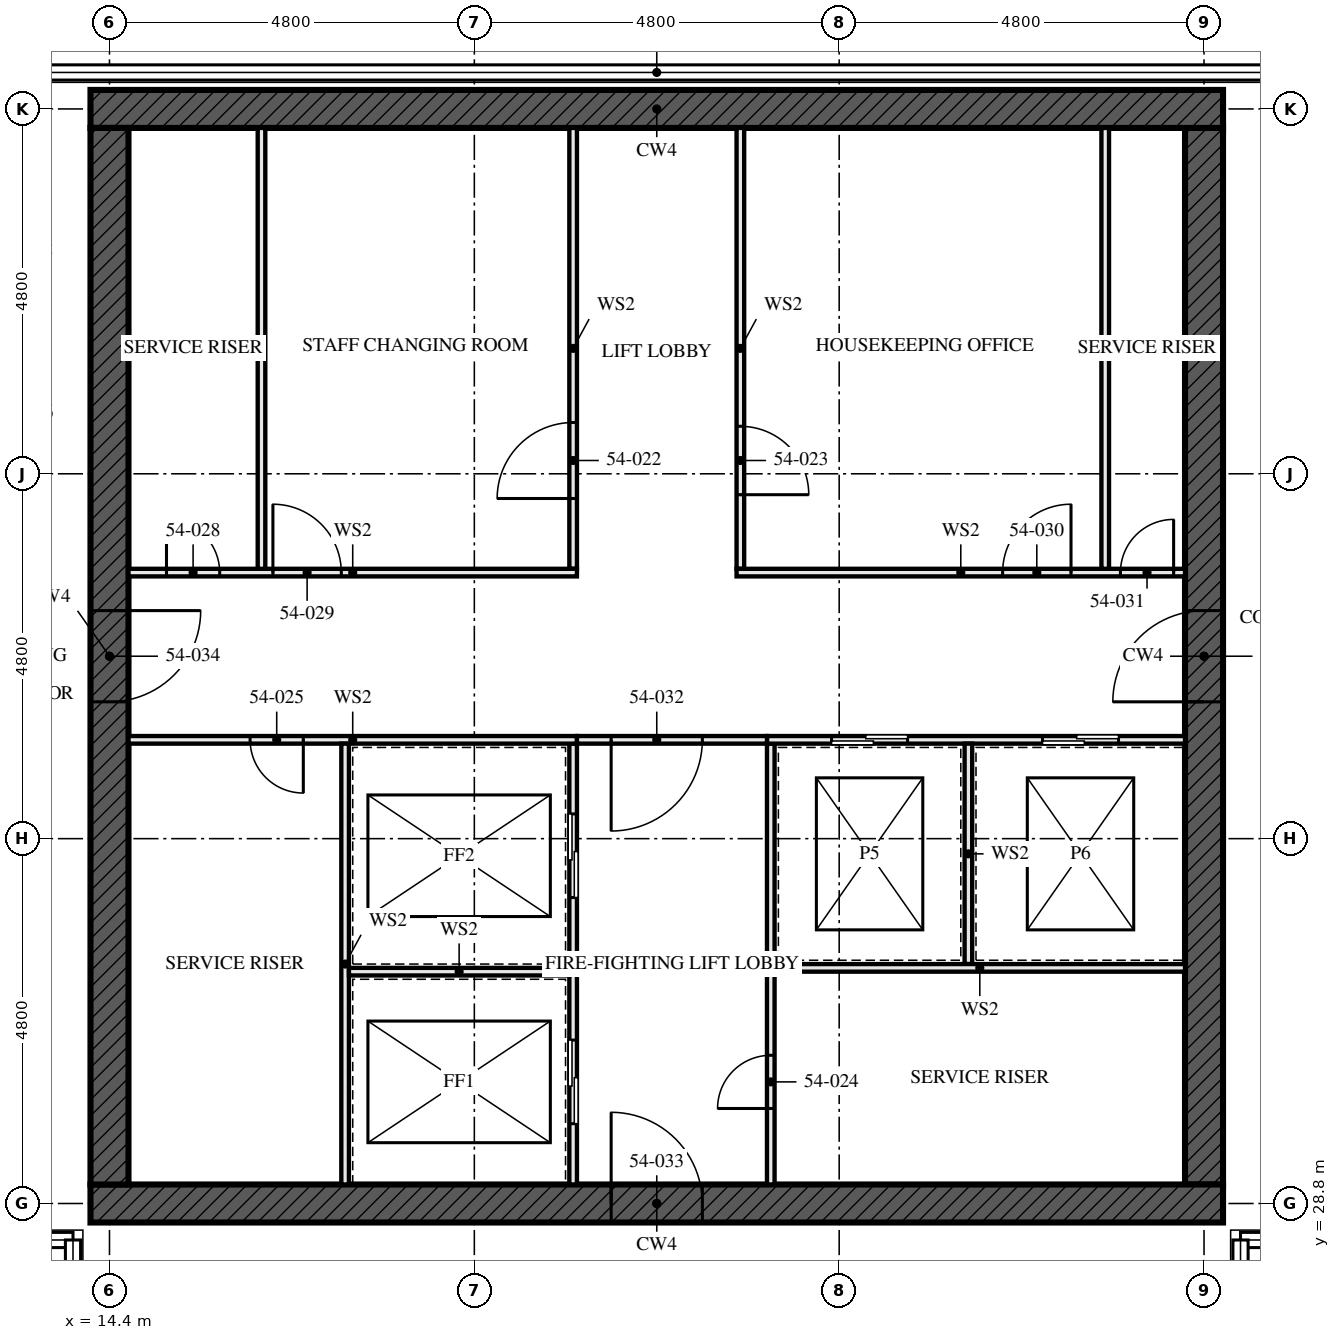
"""IFC4 building model, lengths in metres.
Left out: names, types, materials, properties, quantities, classifications, styles, units other than length and angle.
Written with IfcOpenShell. Run it as: python <this file> out.ifc"""

import sys

from ifc_helpers import new_model, si_unit, direction, frame, frame_2d, origin, place, context, subcontext, project, spatial, rectangle, extrude, element, fill, save


model = new_model("IFC4")
c1 = context("Model", 3, precision=1e-05, world=origin(), true_north=direction((0.0, 1.0)))
c2 = subcontext(c1, "Body", "Model", "MODEL_VIEW")
j1 = project(units=[si_unit("LENGTHUNIT", "METRE"), si_unit("PLANEANGLEUNIT", "RADIAN")], contexts=[c1])
p1 = place(None, origin())
s1 = spatial("IfcSite", under=j1, at=p1, CompositionType="ELEMENT")
p2 = place(p1, origin())
s2 = spatial("IfcBuilding", under=s1, at=p2, CompositionType="ELEMENT")
p3 = place(p2, frame((0.0, 0.0, 198.0)))
s3 = spatial("IfcBuildingStorey", under=s2, at=p3, CompositionType="ELEMENT", Elevation=198.0)
p4 = place(p3, frame((14.15, 28.8, -0.17), z_axis=(0.0, 0.0, 1.0), x_axis=(1.0, 0.0, 0.0)))
e1 = element("IfcWall", 1, at=p4, inside=s3, PredefinedType="SHEAR", context=c2, shape_type="SweptSolid", body=[
    extrude(rectangle(XDim=14.9, YDim=0.5, at=frame_2d((7.45, 0.0))), origin(), (0.0, 0.0, 1.0), 3.5),
])
p5 = place(p4, frame((6.85, 0.0, 0.17)))
e2 = element("IfcOpeningElement", 2, at=p5, cuts=e1, PredefinedType="OPENING", context=c2, shape_type="SweptSolid", body=[
    extrude(rectangle(XDim=1.2, YDim=2.1, at=frame_2d((0.6, 1.05))), frame((0.0, 0.26, 0.0), z_axis=(0.0, -1.0, 0.0), x_axis=(1.0, 0.0, 0.0)), (0.0, 0.0, 1.0), 0.521),
])
p6 = place(p3, frame((29.05, 43.2, -0.17), z_axis=(0.0, 0.0, 1.0), x_axis=(-1.0, 0.0, 0.0)))
e3 = element("IfcWall", 3, at=p6, inside=s3, PredefinedType="SHEAR", context=c2, shape_type="SweptSolid", body=[
    extrude(rectangle(XDim=14.9, YDim=0.5, at=frame_2d((7.45, 0.0))), origin(), (0.0, 0.0, 1.0), 3.5),
])
p7 = place(p3, frame((14.4, 42.95, -0.17), z_axis=(0.0, 0.0, 1.0), x_axis=(0.0, -1.0, 0.0)))
e4 = element("IfcWall", 4, at=p7, inside=s3, PredefinedType="SHEAR", context=c2, shape_type="SweptSolid", body=[
    extrude(rectangle(XDim=13.9, YDim=0.5, at=frame_2d((6.95, 0.0))), origin(), (0.0, 0.0, 1.0), 3.5),
])
p8 = place(p7, frame((6.35, 0.0, 0.17)))
e5 = element("IfcOpeningElement", 5, at=p8, cuts=e4, PredefinedType="OPENING", context=c2, shape_type="SweptSolid", body=[
    extrude(rectangle(XDim=1.2, YDim=2.1, at=frame_2d((0.6, 1.05))), frame((0.0, 0.26, 0.0), z_axis=(0.0, -1.0, 0.0), x_axis=(1.0, 0.0, 0.0)), (0.0, 0.0, 1.0), 0.521),
])
p9 = place(p3, frame((28.8, 29.05, -0.17), z_axis=(0.0, 0.0, 1.0), x_axis=(0.0, 1.0, 0.0)))
e6 = element("IfcWall", 6, at=p9, inside=s3, PredefinedType="SHEAR", context=c2, shape_type="SweptSolid", body=[
    extrude(rectangle(XDim=13.9, YDim=0.5, at=frame_2d((6.95, 0.0))), origin(), (0.0, 0.0, 1.0), 3.5),
])
p10 = place(p9, frame((6.35, 0.0, 0.17)))
e7 = element("IfcOpeningElement", 7, at=p10, cuts=e6, PredefinedType="OPENING", context=c2, shape_type="SweptSolid", body=[
    extrude(rectangle(XDim=1.2, YDim=2.1, at=frame_2d((0.6, 1.05))), frame((0.0, 0.26, 0.0), z_axis=(0.0, -1.0, 0.0), x_axis=(1.0, 0.0, 0.0)), (0.0, 0.0, 1.0), 0.521),
])
for number, where, z_axis, x_axis in (
    (8, (16.4, 37.15, 0.0), (0.0, 0.0, 1.0), (0.0, 1.0, 0.0)),
    (9, (27.5, 37.15, 0.0), (0.0, 0.0, 1.0), (0.0, 1.0, 0.0)),
):
    element("IfcWall", number, at=place(p3, frame(where, z_axis=z_axis, x_axis=x_axis)), inside=s3, PredefinedType="SOLIDWALL", context=c2, shape_type="SweptSolid", body=[
        extrude(rectangle(XDim=5.8, YDim=0.1, at=frame_2d((2.9, 0.0))), origin(), (0.0, 0.0, 1.0), 3.33),
    ])
p11 = place(p3, frame((20.5, 29.05, 0.0), z_axis=(0.0, 0.0, 1.0), x_axis=(0.0, 1.0, 0.0)))
e10 = element("IfcWall", 10, at=p11, inside=s3, PredefinedType="SOLIDWALL", context=c2, shape_type="SweptSolid", body=[
    extrude(rectangle(XDim=5.8, YDim=0.1, at=frame_2d((2.9, 0.0))), origin(), (0.0, 0.0, 1.0), 3.33),
])
p12 = place(p11, frame((0.8, 0.0, 0.0)))
e11 = element("IfcOpeningElement", 11, at=p12, cuts=e10, PredefinedType="OPENING", context=c2, shape_type="SweptSolid", body=[
    extrude(rectangle(XDim=1.1, YDim=2.3, at=frame_2d((0.55, 1.15))), frame((0.0, 0.061, 0.0), z_axis=(0.0, -1.0, 0.0), x_axis=(1.0, 0.0, 0.0)), (0.0, 0.0, 1.0), 0.121),
])
p13 = place(p11, frame((3.775, 0.0, 0.0)))
e12 = element("IfcOpeningElement", 12, at=p13, cuts=e10, PredefinedType="OPENING", context=c2, shape_type="SweptSolid", body=[
    extrude(rectangle(XDim=1.1, YDim=2.3, at=frame_2d((0.55, 1.15))), frame((0.0, 0.061, 0.0), z_axis=(0.0, -1.0, 0.0), x_axis=(1.0, 0.0, 0.0)), (0.0, 0.0, 1.0), 0.121),
])
p14 = place(p3, frame((20.5, 37.15, 0.0), z_axis=(0.0, 0.0, 1.0), x_axis=(0.0, 1.0, 0.0)))
e13 = element("IfcWall", 13, at=p14, inside=s3, PredefinedType="SOLIDWALL", context=c2, shape_type="SweptSolid", body=[
    extrude(rectangle(XDim=5.8, YDim=0.1, at=frame_2d((2.9, 0.0))), origin(), (0.0, 0.0, 1.0), 3.33),
])
p15 = place(p14, frame((0.925, 0.0, 0.0)))
e14 = element("IfcOpeningElement", 14, at=p15, cuts=e13, PredefinedType="OPENING", context=c2, shape_type="SweptSolid", body=[
    extrude(rectangle(XDim=1.0, YDim=2.1, at=frame_2d((0.5, 1.05))), frame((0.0, 0.061, 0.0), z_axis=(0.0, -1.0, 0.0), x_axis=(1.0, 0.0, 0.0)), (0.0, 0.0, 1.0), 0.121),
])
p16 = place(p3, frame((22.7, 37.15, 0.0), z_axis=(0.0, 0.0, 1.0), x_axis=(0.0, 1.0, 0.0)))
e15 = element("IfcWall", 15, at=p16, inside=s3, PredefinedType="SOLIDWALL", context=c2, shape_type="SweptSolid", body=[
    extrude(rectangle(XDim=5.8, YDim=0.1, at=frame_2d((2.9, 0.0))), origin(), (0.0, 0.0, 1.0), 3.33),
])
p17 = place(p16, frame((0.975, 0.0, 0.0)))
e16 = element("IfcOpeningElement", 16, at=p17, cuts=e15, PredefinedType="OPENING", context=c2, shape_type="SweptSolid", body=[
    extrude(rectangle(XDim=0.9, YDim=2.1, at=frame_2d((0.45, 1.05))), frame((0.0, 0.061, 0.0), z_axis=(0.0, -1.0, 0.0), x_axis=(1.0, 0.0, 0.0)), (0.0, 0.0, 1.0), 0.121),
])
p18 = place(p3, frame((23.1, 29.05, 0.0), z_axis=(0.0, 0.0, 1.0), x_axis=(0.0, 1.0, 0.0)))
e17 = element("IfcWall", 17, at=p18, inside=s3, PredefinedType="SOLIDWALL", context=c2, shape_type="SweptSolid", body=[
    extrude(rectangle(XDim=5.8, YDim=0.1, at=frame_2d((2.9, 0.0))), origin(), (0.0, 0.0, 1.0), 3.33),
])
p19 = place(p18, frame((1.0, 0.0, 0.0)))
e18 = element("IfcOpeningElement", 18, at=p19, cuts=e17, PredefinedType="OPENING", context=c2, shape_type="SweptSolid", body=[
    extrude(rectangle(XDim=0.7, YDim=2.1, at=frame_2d((0.35, 1.05))), frame((0.0, 0.061, 0.0), z_axis=(0.0, -1.0, 0.0), x_axis=(1.0, 0.0, 0.0)), (0.0, 0.0, 1.0), 0.121),
])
p20 = place(p3, frame((14.65, 34.9, 0.0), z_axis=(0.0, 0.0, 1.0), x_axis=(1.0, 0.0, 0.0)))
e19 = element("IfcWall", 19, at=p20, inside=s3, PredefinedType="SOLIDWALL", context=c2, shape_type="SweptSolid", body=[
    extrude(rectangle(XDim=5.9, YDim=0.1, at=frame_2d((2.95, 0.0))), origin(), (0.0, 0.0, 1.0), 3.33),
])
p21 = place(p20, frame((1.6, 0.0, 0.0)))
e20 = element("IfcOpeningElement", 20, at=p21, cuts=e19, PredefinedType="OPENING", context=c2, shape_type="SweptSolid", body=[
    extrude(rectangle(XDim=0.7, YDim=2.1, at=frame_2d((0.35, 1.05))), frame((0.0, 0.061, 0.0), z_axis=(0.0, -1.0, 0.0), x_axis=(1.0, 0.0, 0.0)), (0.0, 0.0, 1.0), 0.121),
])
p22 = place(p3, frame((23.05, 34.9, 0.0), z_axis=(0.0, 0.0, 1.0), x_axis=(1.0, 0.0, 0.0)))
e21 = element("IfcWall", 21, at=p22, inside=s3, PredefinedType="SOLIDWALL", context=c2, shape_type="SweptSolid", body=[
    extrude(rectangle(XDim=5.5, YDim=0.1, at=frame_2d((2.75, 0.0))), origin(), (0.0, 0.0, 1.0), 3.33),
])
p23 = place(p22, frame((0.85, 0.0, 0.0)))
e22 = element("IfcOpeningElement", 22, at=p23, cuts=e21, PredefinedType="OPENING", context=c2, shape_type="SweptSolid", body=[
    extrude(rectangle(XDim=1.0, YDim=2.1, at=frame_2d((0.5, 1.05))), frame((0.0, 0.061, 0.0), z_axis=(0.0, -1.0, 0.0), x_axis=(1.0, 0.0, 0.0)), (0.0, 0.0, 1.0), 0.121),
])
p24 = place(p22, frame((3.625, 0.0, 0.0)))
e23 = element("IfcOpeningElement", 23, at=p24, cuts=e21, PredefinedType="OPENING", context=c2, shape_type="SweptSolid", body=[
    extrude(rectangle(XDim=1.0, YDim=2.1, at=frame_2d((0.5, 1.05))), frame((0.0, 0.061, 0.0), z_axis=(0.0, -1.0, 0.0), x_axis=(1.0, 0.0, 0.0)), (0.0, 0.0, 1.0), 0.121),
])
p25 = place(p3, frame((14.65, 37.1, 0.0), z_axis=(0.0, 0.0, 1.0), x_axis=(1.0, 0.0, 0.0)))
e24 = element("IfcWall", 24, at=p25, inside=s3, PredefinedType="SOLIDWALL", context=c2, shape_type="SweptSolid", body=[
    extrude(rectangle(XDim=5.9, YDim=0.1, at=frame_2d((2.95, 0.0))), origin(), (0.0, 0.0, 1.0), 3.33),
])
p26 = place(p25, frame((0.5, 0.0, 0.0)))
e25 = element("IfcOpeningElement", 25, at=p26, cuts=e24, PredefinedType="OPENING", context=c2, shape_type="SweptSolid", body=[
    extrude(rectangle(XDim=0.7, YDim=2.1, at=frame_2d((0.35, 1.05))), frame((0.0, 0.061, 0.0), z_axis=(0.0, -1.0, 0.0), x_axis=(1.0, 0.0, 0.0)), (0.0, 0.0, 1.0), 0.121),
])
p27 = place(p25, frame((1.9, 0.0, 0.0)))
e26 = element("IfcOpeningElement", 26, at=p27, cuts=e24, PredefinedType="OPENING", context=c2, shape_type="SweptSolid", body=[
    extrude(rectangle(XDim=0.9, YDim=2.1, at=frame_2d((0.45, 1.05))), frame((0.0, 0.061, 0.0), z_axis=(0.0, -1.0, 0.0), x_axis=(1.0, 0.0, 0.0)), (0.0, 0.0, 1.0), 0.121),
])
p28 = place(p3, frame((22.65, 37.1, 0.0), z_axis=(0.0, 0.0, 1.0), x_axis=(1.0, 0.0, 0.0)))
e27 = element("IfcWall", 27, at=p28, inside=s3, PredefinedType="SOLIDWALL", context=c2, shape_type="SweptSolid", body=[
    extrude(rectangle(XDim=5.9, YDim=0.1, at=frame_2d((2.95, 0.0))), origin(), (0.0, 0.0, 1.0), 3.33),
])
p29 = place(p28, frame((3.5, 0.0, 0.0)))
e28 = element("IfcOpeningElement", 28, at=p29, cuts=e27, PredefinedType="OPENING", context=c2, shape_type="SweptSolid", body=[
    extrude(rectangle(XDim=0.9, YDim=2.1, at=frame_2d((0.45, 1.05))), frame((0.0, 0.061, 0.0), z_axis=(0.0, -1.0, 0.0), x_axis=(1.0, 0.0, 0.0)), (0.0, 0.0, 1.0), 0.121),
])
p30 = place(p28, frame((5.05, 0.0, 0.0)))
e29 = element("IfcOpeningElement", 29, at=p30, cuts=e27, PredefinedType="OPENING", context=c2, shape_type="SweptSolid", body=[
    extrude(rectangle(XDim=0.7, YDim=2.1, at=frame_2d((0.35, 1.05))), frame((0.0, 0.061, 0.0), z_axis=(0.0, -1.0, 0.0), x_axis=(1.0, 0.0, 0.0)), (0.0, 0.0, 1.0), 0.121),
])
p31 = place(p3, frame((20.55, 34.9, 0.0), z_axis=(0.0, 0.0, 1.0), x_axis=(1.0, 0.0, 0.0)))
e30 = element("IfcWall", 30, at=p31, inside=s3, PredefinedType="SOLIDWALL", context=c2, shape_type="SweptSolid", body=[
    extrude(rectangle(XDim=2.5, YDim=0.1, at=frame_2d((1.25, 0.0))), origin(), (0.0, 0.0, 1.0), 3.33),
])
p32 = place(p31, frame((0.45, 0.0, 0.0)))
e31 = element("IfcOpeningElement", 31, at=p32, cuts=e30, PredefinedType="OPENING", context=c2, shape_type="SweptSolid", body=[
    extrude(rectangle(XDim=1.2, YDim=2.1, at=frame_2d((0.6, 1.05))), frame((0.0, 0.061, 0.0), z_axis=(0.0, -1.0, 0.0), x_axis=(1.0, 0.0, 0.0)), (0.0, 0.0, 1.0), 0.121),
])
p33 = place(p3, frame((17.5, 29.05, 0.0), z_axis=(0.0, 0.0, 1.0), x_axis=(0.0, 1.0, 0.0)))
e32 = element("IfcWall", 32, at=p33, inside=s3, PredefinedType="SOLIDWALL", context=c2, shape_type="SweptSolid", body=[
    extrude(rectangle(XDim=5.8, YDim=0.1, at=frame_2d((2.9, 0.0))), origin(), (0.0, 0.0, 1.0), 3.33),
])
p34 = place(p3, frame((17.55, 31.85, 0.0), z_axis=(0.0, 0.0, 1.0), x_axis=(1.0, 0.0, 0.0)))
e33 = element("IfcWall", 33, at=p34, inside=s3, PredefinedType="SOLIDWALL", context=c2, shape_type="SweptSolid", body=[
    extrude(rectangle(XDim=2.9, YDim=0.1, at=frame_2d((1.45, 0.0))), origin(), (0.0, 0.0, 1.0), 3.33),
])
p35 = place(p3, frame((25.7, 31.95, 0.0), z_axis=(0.0, 0.0, 1.0), x_axis=(0.0, 1.0, 0.0)))
e34 = element("IfcWall", 34, at=p35, inside=s3, PredefinedType="SOLIDWALL", context=c2, shape_type="SweptSolid", body=[
    extrude(rectangle(XDim=2.9, YDim=0.1, at=frame_2d((1.45, 0.0))), origin(), (0.0, 0.0, 1.0), 3.33),
])
p36 = place(p3, frame((23.15, 31.9, 0.0), z_axis=(0.0, 0.0, 1.0), x_axis=(1.0, 0.0, 0.0)))
e35 = element("IfcWall", 35, at=p36, inside=s3, PredefinedType="SOLIDWALL", context=c2, shape_type="SweptSolid", body=[
    extrude(rectangle(XDim=5.4, YDim=0.1, at=frame_2d((2.7, 0.0))), origin(), (0.0, 0.0, 1.0), 3.33),
])
p37 = place(p12, origin())
e36 = element("IfcDoor", 36, at=p37, inside=s3, OperationType="SLIDING_TO_LEFT", PredefinedType="DOOR", context=c2, shape_type="SweptSolid", body=[
    extrude(rectangle(XDim=1.1, YDim=2.3, at=frame_2d((0.55, 1.15))), frame((0.0, 0.05, 0.0), z_axis=(0.0, -1.0, 0.0), x_axis=(1.0, 0.0, 0.0)), (0.0, 0.0, 1.0), 0.1),
])
fill(e11, e36)
p38 = place(p13, origin())
e37 = element("IfcDoor", 37, at=p38, inside=s3, OperationType="SLIDING_TO_LEFT", PredefinedType="DOOR", context=c2, shape_type="SweptSolid", body=[
    extrude(rectangle(XDim=1.1, YDim=2.3, at=frame_2d((0.55, 1.15))), frame((0.0, 0.05, 0.0), z_axis=(0.0, -1.0, 0.0), x_axis=(1.0, 0.0, 0.0)), (0.0, 0.0, 1.0), 0.1),
])
fill(e12, e37)
p39 = place(p15, origin())
e38 = element("IfcDoor", 38, at=p39, inside=s3, OperationType="SINGLE_SWING_RIGHT", PredefinedType="DOOR", context=c2, shape_type="SweptSolid", body=[
    extrude(rectangle(XDim=1.0, YDim=2.1, at=frame_2d((0.5, 1.05))), frame((0.0, 0.027, 0.0), z_axis=(0.0, -1.0, 0.0), x_axis=(1.0, 0.0, 0.0)), (0.0, 0.0, 1.0), 0.054),
])
fill(e14, e38)
p40 = place(p17, frame((0.9, 0.0, 0.0), z_axis=(0.0, 0.0, 1.0), x_axis=(-1.0, 0.0, 0.0)))
e39 = element("IfcDoor", 39, at=p40, inside=s3, OperationType="SINGLE_SWING_LEFT", PredefinedType="DOOR", context=c2, shape_type="SweptSolid", body=[
    extrude(rectangle(XDim=0.9, YDim=2.1, at=frame_2d((0.45, 1.05))), frame((0.0, 0.027, 0.0), z_axis=(0.0, -1.0, 0.0), x_axis=(1.0, 0.0, 0.0)), (0.0, 0.0, 1.0), 0.054),
])
fill(e16, e39)
p41 = place(p19, origin())
e40 = element("IfcDoor", 40, at=p41, inside=s3, OperationType="SINGLE_SWING_RIGHT", PredefinedType="DOOR", context=c2, shape_type="SweptSolid", body=[
    extrude(rectangle(XDim=0.7, YDim=2.1, at=frame_2d((0.35, 1.05))), frame((0.0, 0.027, 0.0), z_axis=(0.0, -1.0, 0.0), x_axis=(1.0, 0.0, 0.0)), (0.0, 0.0, 1.0), 0.054),
])
fill(e18, e40)
p42 = place(p21, frame((0.7, 0.0, 0.0), z_axis=(0.0, 0.0, 1.0), x_axis=(-1.0, 0.0, 0.0)))
e41 = element("IfcDoor", 41, at=p42, inside=s3, OperationType="SINGLE_SWING_RIGHT", PredefinedType="DOOR", context=c2, shape_type="SweptSolid", body=[
    extrude(rectangle(XDim=0.7, YDim=2.1, at=frame_2d((0.35, 1.05))), frame((0.0, 0.027, 0.0), z_axis=(0.0, -1.0, 0.0), x_axis=(1.0, 0.0, 0.0)), (0.0, 0.0, 1.0), 0.054),
])
fill(e20, e41)
p43 = place(p23, origin())
e42 = element("IfcDoor", 42, at=p43, inside=s3, OperationType="SLIDING_TO_LEFT", PredefinedType="DOOR", context=c2, shape_type="SweptSolid", body=[
    extrude(rectangle(XDim=1.0, YDim=2.1, at=frame_2d((0.5, 1.05))), frame((0.0, 0.05, 0.0), z_axis=(0.0, -1.0, 0.0), x_axis=(1.0, 0.0, 0.0)), (0.0, 0.0, 1.0), 0.1),
])
fill(e22, e42)
p44 = place(p24, origin())
e43 = element("IfcDoor", 43, at=p44, inside=s3, OperationType="SLIDING_TO_LEFT", PredefinedType="DOOR", context=c2, shape_type="SweptSolid", body=[
    extrude(rectangle(XDim=1.0, YDim=2.1, at=frame_2d((0.5, 1.05))), frame((0.0, 0.05, 0.0), z_axis=(0.0, -1.0, 0.0), x_axis=(1.0, 0.0, 0.0)), (0.0, 0.0, 1.0), 0.1),
])
fill(e23, e43)
p45 = place(p26, origin())
e44 = element("IfcDoor", 44, at=p45, inside=s3, OperationType="SINGLE_SWING_RIGHT", PredefinedType="DOOR", context=c2, shape_type="SweptSolid", body=[
    extrude(rectangle(XDim=0.7, YDim=2.1, at=frame_2d((0.35, 1.05))), frame((0.0, 0.027, 0.0), z_axis=(0.0, -1.0, 0.0), x_axis=(1.0, 0.0, 0.0)), (0.0, 0.0, 1.0), 0.054),
])
fill(e25, e44)
p46 = place(p27, origin())
e45 = element("IfcDoor", 45, at=p46, inside=s3, OperationType="SINGLE_SWING_RIGHT", PredefinedType="DOOR", context=c2, shape_type="SweptSolid", body=[
    extrude(rectangle(XDim=0.9, YDim=2.1, at=frame_2d((0.45, 1.05))), frame((0.0, 0.027, 0.0), z_axis=(0.0, -1.0, 0.0), x_axis=(1.0, 0.0, 0.0)), (0.0, 0.0, 1.0), 0.054),
])
fill(e26, e45)
p47 = place(p29, origin())
e46 = element("IfcDoor", 46, at=p47, inside=s3, OperationType="SINGLE_SWING_LEFT", PredefinedType="DOOR", context=c2, shape_type="SweptSolid", body=[
    extrude(rectangle(XDim=0.9, YDim=2.1, at=frame_2d((0.45, 1.05))), frame((0.0, 0.027, 0.0), z_axis=(0.0, -1.0, 0.0), x_axis=(1.0, 0.0, 0.0)), (0.0, 0.0, 1.0), 0.054),
])
fill(e28, e46)
p48 = place(p30, origin())
e47 = element("IfcDoor", 47, at=p48, inside=s3, OperationType="SINGLE_SWING_LEFT", PredefinedType="DOOR", context=c2, shape_type="SweptSolid", body=[
    extrude(rectangle(XDim=0.7, YDim=2.1, at=frame_2d((0.35, 1.05))), frame((0.0, 0.027, 0.0), z_axis=(0.0, -1.0, 0.0), x_axis=(1.0, 0.0, 0.0)), (0.0, 0.0, 1.0), 0.054),
])
fill(e29, e47)
p49 = place(p32, frame((1.2, 0.0, 0.0), z_axis=(0.0, 0.0, 1.0), x_axis=(-1.0, 0.0, 0.0)))
e48 = element("IfcDoor", 48, at=p49, inside=s3, OperationType="SINGLE_SWING_LEFT", PredefinedType="DOOR", context=c2, shape_type="SweptSolid", body=[
    extrude(rectangle(XDim=1.2, YDim=2.1, at=frame_2d((0.6, 1.05))), frame((0.0, 0.027, 0.0), z_axis=(0.0, -1.0, 0.0), x_axis=(1.0, 0.0, 0.0)), (0.0, 0.0, 1.0), 0.054),
])
fill(e31, e48)
p50 = place(p5, origin())
e49 = element("IfcDoor", 49, at=p50, inside=s3, OperationType="SINGLE_SWING_LEFT", PredefinedType="DOOR", context=c2, shape_type="SweptSolid", body=[
    extrude(rectangle(XDim=1.2, YDim=2.1, at=frame_2d((0.6, 1.05))), frame((0.0, 0.027, 0.0), z_axis=(0.0, -1.0, 0.0), x_axis=(1.0, 0.0, 0.0)), (0.0, 0.0, 1.0), 0.054),
])
fill(e2, e49)
p51 = place(p8, origin())
e50 = element("IfcDoor", 50, at=p51, inside=s3, OperationType="SINGLE_SWING_LEFT", PredefinedType="DOOR", context=c2, shape_type="SweptSolid", body=[
    extrude(rectangle(XDim=1.2, YDim=2.1, at=frame_2d((0.6, 1.05))), frame((0.0, 0.027, 0.0), z_axis=(0.0, -1.0, 0.0), x_axis=(1.0, 0.0, 0.0)), (0.0, 0.0, 1.0), 0.054),
])
fill(e5, e50)
p52 = place(p10, origin())
e51 = element("IfcDoor", 51, at=p52, inside=s3, OperationType="SINGLE_SWING_LEFT", PredefinedType="DOOR", context=c2, shape_type="SweptSolid", body=[
    extrude(rectangle(XDim=1.2, YDim=2.1, at=frame_2d((0.6, 1.05))), frame((0.0, 0.027, 0.0), z_axis=(0.0, -1.0, 0.0), x_axis=(1.0, 0.0, 0.0)), (0.0, 0.0, 1.0), 0.054),
])
fill(e7, e51)
save(model, sys.argv[1])
